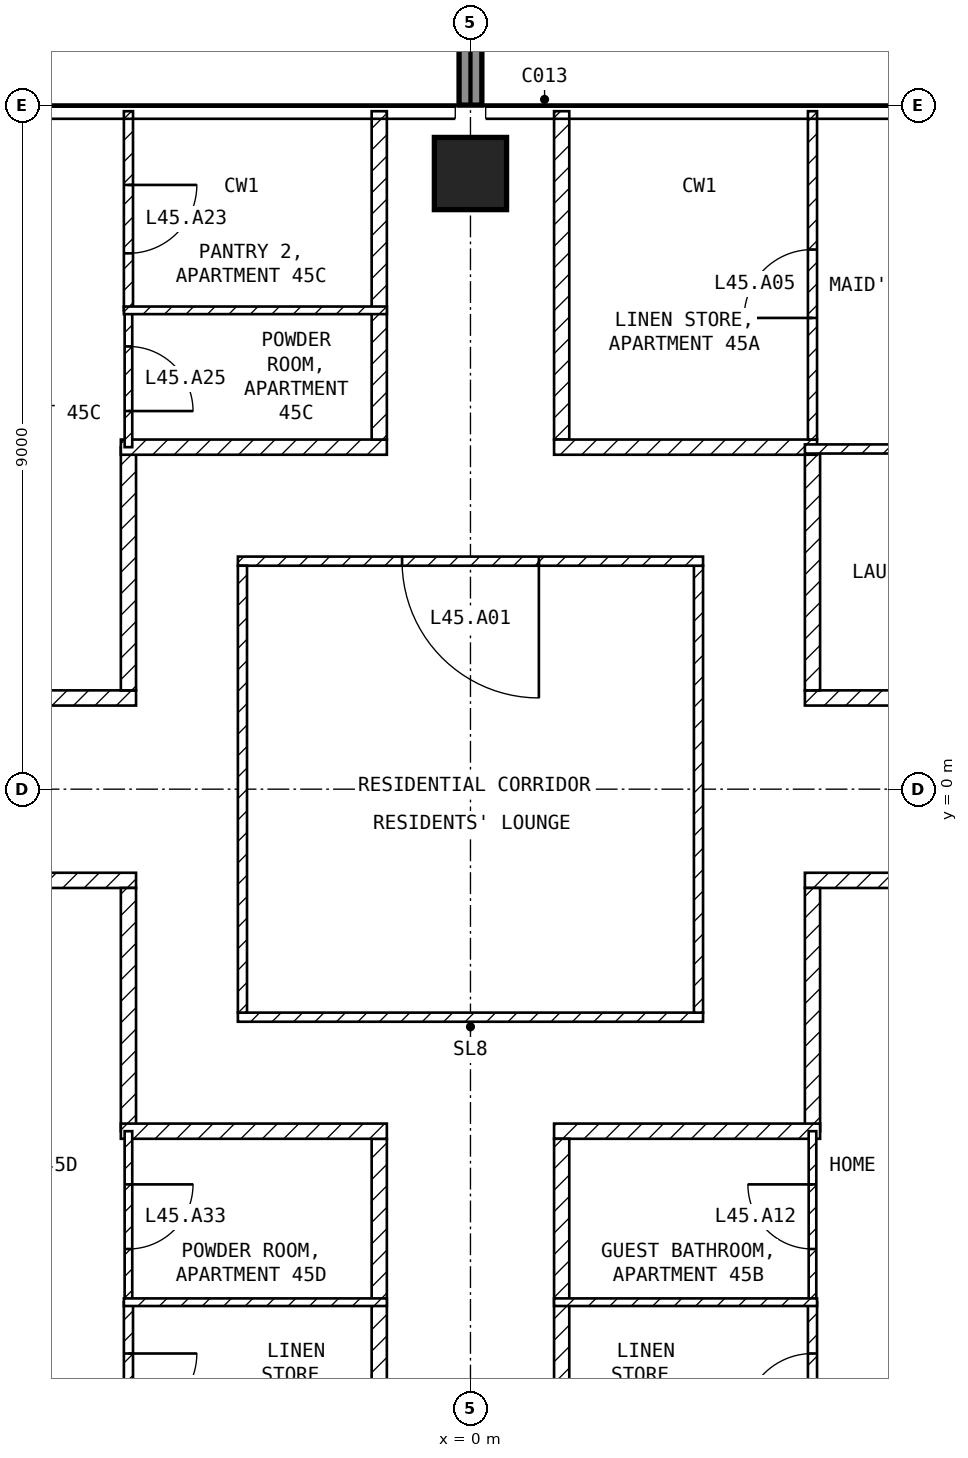
"""IFC4 building model, lengths in metres.
Left out: names, types, materials, properties, quantities, classifications, styles, units other than length and angle.
Written with IfcOpenShell. Run it as: python <this file> out.ifc"""

import sys

from ifc_helpers import new_model, si_unit, direction, frame, frame_2d, origin, origin_2d, place, context, subcontext, project, spatial, rectangle, extrude, element, fill, save


model = new_model("IFC4")
c1 = context("Model", 3, precision=1e-05, world=origin(), true_north=direction((0.0, 1.0)))
c2 = subcontext(c1, "Body", "Model", "MODEL_VIEW")
j1 = project(units=[si_unit("LENGTHUNIT", "METRE"), si_unit("PLANEANGLEUNIT", "RADIAN")], contexts=[c1])
p1 = place(None, origin())
s1 = spatial("IfcSite", under=j1, at=p1, CompositionType="ELEMENT")
p2 = place(p1, origin())
s2 = spatial("IfcBuilding", under=s1, at=p2, CompositionType="ELEMENT")
p3 = place(p2, frame((0.0, 0.0, 184.1)))
s3 = spatial("IfcBuildingStorey", under=s2, at=p3, CompositionType="ELEMENT", Elevation=184.1)
p4 = place(p3, frame((0.0, 8.1, -0.25), z_axis=(0.0, 0.0, 1.0), x_axis=(1.0, 0.0, 0.0)))
e1 = element("IfcColumn", 1, at=p4, inside=s3, PredefinedType="COLUMN", context=c2, shape_type="SweptSolid", body=[
    extrude(rectangle(XDim=0.95, YDim=0.95, at=origin_2d()), origin(), (0.0, 0.0, 1.0), 3.5),
])
p5 = place(p3, frame((0.0, 9.0, 0.0), z_axis=(0.0, 0.0, 1.0), x_axis=(0.0, 1.0, 0.0)))
e2 = element("IfcWall", 2, at=p5, inside=s3, PredefinedType="SOLIDWALL", context=c2, shape_type="SweptSolid", body=[
    extrude(rectangle(XDim=2.7, YDim=0.3, at=frame_2d((1.35, 0.0))), origin(), (0.0, 0.0, 1.0), 3.25),
])
p6 = place(p3, frame((-3.06, -3.0, 0.0), z_axis=(0.0, 0.0, 1.0), x_axis=(1.0, 0.0, 0.0)))
e3 = element("IfcWall", 3, at=p6, inside=s3, PredefinedType="PARTITIONING", context=c2, shape_type="SweptSolid", body=[
    extrude(rectangle(XDim=6.12, YDim=0.12, at=frame_2d((3.06, 0.0))), origin(), (0.0, 0.0, 1.0), 3.25),
])
p7 = place(p3, frame((3.0, -2.94, 0.0), z_axis=(0.0, 0.0, 1.0), x_axis=(0.0, 1.0, 0.0)))
e4 = element("IfcWall", 4, at=p7, inside=s3, PredefinedType="PARTITIONING", context=c2, shape_type="SweptSolid", body=[
    extrude(rectangle(XDim=5.88, YDim=0.12, at=frame_2d((2.94, 0.0))), origin(), (0.0, 0.0, 1.0), 3.25),
])
p8 = place(p3, frame((3.06, 3.0, 0.0), z_axis=(0.0, 0.0, 1.0), x_axis=(-1.0, 0.0, 0.0)))
e5 = element("IfcWall", 5, at=p8, inside=s3, PredefinedType="PARTITIONING", context=c2, shape_type="SweptSolid", body=[
    extrude(rectangle(XDim=6.12, YDim=0.12, at=frame_2d((3.06, 0.0))), origin(), (0.0, 0.0, 1.0), 3.25),
])
p9 = place(p8, frame((2.16, 0.0, 0.0)))
e6 = element("IfcOpeningElement", 6, at=p9, cuts=e5, PredefinedType="OPENING", context=c2, shape_type="SweptSolid", body=[
    extrude(rectangle(XDim=1.8, YDim=2.1, at=frame_2d((0.9, 1.05))), frame((0.0, 0.07, 0.0), z_axis=(0.0, -1.0, 0.0), x_axis=(1.0, 0.0, 0.0)), (0.0, 0.0, 1.0), 0.14),
])
p10 = place(p3, frame((-3.0, 2.94, 0.0), z_axis=(0.0, 0.0, 1.0), x_axis=(0.0, -1.0, 0.0)))
e7 = element("IfcWall", 7, at=p10, inside=s3, PredefinedType="PARTITIONING", context=c2, shape_type="SweptSolid", body=[
    extrude(rectangle(XDim=5.88, YDim=0.12, at=frame_2d((2.94, 0.0))), origin(), (0.0, 0.0, 1.0), 3.25),
])
p11 = place(p3, frame((4.4, 1.2, 0.0), z_axis=(0.0, 0.0, 1.0), x_axis=(1.0, 0.0, 0.0)))
e8 = element("IfcWall", 8, at=p11, inside=s3, PredefinedType="PARTITIONING", context=c2, shape_type="SweptSolid", body=[
    extrude(rectangle(XDim=17.2, YDim=0.2, at=frame_2d((8.6, 0.0))), origin(), (0.0, 0.0, 1.0), 3.25),
])
p12 = place(p11, frame((8.675, 0.0, 0.0)))
e9 = element("IfcOpeningElement", 9, at=p12, cuts=e8, PredefinedType="OPENING", context=c2, shape_type="SweptSolid", body=[
    extrude(rectangle(XDim=1.0, YDim=2.1, at=frame_2d((0.5, 1.05))), frame((0.0, 0.11, 0.0), z_axis=(0.0, -1.0, 0.0), x_axis=(1.0, 0.0, 0.0)), (0.0, 0.0, 1.0), 0.22),
])
p13 = place(p3, frame((4.5, 4.416, 0.0), z_axis=(0.0, 0.0, 1.0), x_axis=(0.0, -1.0, 0.0)))
e10 = element("IfcWall", 10, at=p13, inside=s3, PredefinedType="PARTITIONING", context=c2, shape_type="SweptSolid", body=[
    extrude(rectangle(XDim=3.116, YDim=0.2, at=frame_2d((1.558, 0.0))), origin(), (0.0, 0.0, 1.0), 3.25),
])
p14 = place(p3, frame((1.2, 8.92, 0.0), z_axis=(0.0, 0.0, 1.0), x_axis=(0.0, -1.0, 0.0)))
e11 = element("IfcWall", 11, at=p14, inside=s3, PredefinedType="PARTITIONING", context=c2, shape_type="SweptSolid", body=[
    extrude(rectangle(XDim=4.32, YDim=0.2, at=frame_2d((2.16, 0.0))), origin(), (0.0, 0.0, 1.0), 3.25),
])
p15 = place(p3, frame((1.1, 4.5, 0.0), z_axis=(0.0, 0.0, 1.0), x_axis=(1.0, 0.0, 0.0)))
e12 = element("IfcWall", 12, at=p15, inside=s3, PredefinedType="PARTITIONING", context=c2, shape_type="SweptSolid", body=[
    extrude(rectangle(XDim=3.46, YDim=0.2, at=frame_2d((1.73, 0.0))), origin(), (0.0, 0.0, 1.0), 3.25),
])
p16 = place(p3, frame((21.6, -1.2, 0.0), z_axis=(0.0, 0.0, 1.0), x_axis=(-1.0, 0.0, 0.0)))
e13 = element("IfcWall", 13, at=p16, inside=s3, PredefinedType="PARTITIONING", context=c2, shape_type="SweptSolid", body=[
    extrude(rectangle(XDim=17.2, YDim=0.2, at=frame_2d((8.6, 0.0))), origin(), (0.0, 0.0, 1.0), 3.25),
])
p17 = place(p16, frame((10.3, 0.0, 0.0)))
e14 = element("IfcOpeningElement", 14, at=p17, cuts=e13, PredefinedType="OPENING", context=c2, shape_type="SweptSolid", body=[
    extrude(rectangle(XDim=1.0, YDim=2.1, at=frame_2d((0.5, 1.05))), frame((0.0, 0.11, 0.0), z_axis=(0.0, -1.0, 0.0), x_axis=(1.0, 0.0, 0.0)), (0.0, 0.0, 1.0), 0.22),
])
p18 = place(p3, frame((4.5, -1.3, 0.0), z_axis=(0.0, 0.0, 1.0), x_axis=(0.0, -1.0, 0.0)))
e15 = element("IfcWall", 15, at=p18, inside=s3, PredefinedType="PARTITIONING", context=c2, shape_type="SweptSolid", body=[
    extrude(rectangle(XDim=3.2, YDim=0.2, at=frame_2d((1.6, 0.0))), origin(), (0.0, 0.0, 1.0), 3.25),
])
p19 = place(p3, frame((4.6, -4.5, 0.0), z_axis=(0.0, 0.0, 1.0), x_axis=(-1.0, 0.0, 0.0)))
e16 = element("IfcWall", 16, at=p19, inside=s3, PredefinedType="PARTITIONING", context=c2, shape_type="SweptSolid", body=[
    extrude(rectangle(XDim=3.5, YDim=0.2, at=frame_2d((1.75, 0.0))), origin(), (0.0, 0.0, 1.0), 3.25),
])
p20 = place(p3, frame((1.2, -4.6, 0.0), z_axis=(0.0, 0.0, 1.0), x_axis=(0.0, -1.0, 0.0)))
e17 = element("IfcWall", 17, at=p20, inside=s3, PredefinedType="PARTITIONING", context=c2, shape_type="SweptSolid", body=[
    extrude(rectangle(XDim=4.3, YDim=0.2, at=frame_2d((2.15, 0.0))), origin(), (0.0, 0.0, 1.0), 3.25),
])
p21 = place(p3, frame((-21.6, 1.2, 0.0), z_axis=(0.0, 0.0, 1.0), x_axis=(1.0, 0.0, 0.0)))
e18 = element("IfcWall", 18, at=p21, inside=s3, PredefinedType="PARTITIONING", context=c2, shape_type="SweptSolid", body=[
    extrude(rectangle(XDim=17.2, YDim=0.2, at=frame_2d((8.6, 0.0))), origin(), (0.0, 0.0, 1.0), 3.25),
])
p22 = place(p21, frame((7.75, 0.0, 0.0)))
e19 = element("IfcOpeningElement", 19, at=p22, cuts=e18, PredefinedType="OPENING", context=c2, shape_type="SweptSolid", body=[
    extrude(rectangle(XDim=1.0, YDim=2.1, at=frame_2d((0.5, 1.05))), frame((0.0, 0.11, 0.0), z_axis=(0.0, -1.0, 0.0), x_axis=(1.0, 0.0, 0.0)), (0.0, 0.0, 1.0), 0.22),
])
p23 = place(p3, frame((-4.5, 1.3, 0.0), z_axis=(0.0, 0.0, 1.0), x_axis=(0.0, 1.0, 0.0)))
e20 = element("IfcWall", 20, at=p23, inside=s3, PredefinedType="PARTITIONING", context=c2, shape_type="SweptSolid", body=[
    extrude(rectangle(XDim=3.2, YDim=0.2, at=frame_2d((1.6, 0.0))), origin(), (0.0, 0.0, 1.0), 3.25),
])
p24 = place(p3, frame((-4.6, 4.5, 0.0), z_axis=(0.0, 0.0, 1.0), x_axis=(1.0, 0.0, 0.0)))
e21 = element("IfcWall", 21, at=p24, inside=s3, PredefinedType="PARTITIONING", context=c2, shape_type="SweptSolid", body=[
    extrude(rectangle(XDim=3.5, YDim=0.2, at=frame_2d((1.75, 0.0))), origin(), (0.0, 0.0, 1.0), 3.25),
])
p25 = place(p3, frame((-1.2, 4.6, 0.0), z_axis=(0.0, 0.0, 1.0), x_axis=(0.0, 1.0, 0.0)))
e22 = element("IfcWall", 22, at=p25, inside=s3, PredefinedType="PARTITIONING", context=c2, shape_type="SweptSolid", body=[
    extrude(rectangle(XDim=4.32, YDim=0.2, at=frame_2d((2.16, 0.0))), origin(), (0.0, 0.0, 1.0), 3.25),
])
p26 = place(p3, frame((-4.4, -1.2, 0.0), z_axis=(0.0, 0.0, 1.0), x_axis=(-1.0, 0.0, 0.0)))
e23 = element("IfcWall", 23, at=p26, inside=s3, PredefinedType="PARTITIONING", context=c2, shape_type="SweptSolid", body=[
    extrude(rectangle(XDim=17.2, YDim=0.2, at=frame_2d((8.6, 0.0))), origin(), (0.0, 0.0, 1.0), 3.25),
])
p27 = place(p26, frame((12.35, 0.0, 0.0)))
e24 = element("IfcOpeningElement", 24, at=p27, cuts=e23, PredefinedType="OPENING", context=c2, shape_type="SweptSolid", body=[
    extrude(rectangle(XDim=1.0, YDim=2.1, at=frame_2d((0.5, 1.05))), frame((0.0, 0.11, 0.0), z_axis=(0.0, -1.0, 0.0), x_axis=(1.0, 0.0, 0.0)), (0.0, 0.0, 1.0), 0.22),
])
p28 = place(p3, frame((-4.5, -4.5, 0.0), z_axis=(0.0, 0.0, 1.0), x_axis=(0.0, 1.0, 0.0)))
e25 = element("IfcWall", 25, at=p28, inside=s3, PredefinedType="PARTITIONING", context=c2, shape_type="SweptSolid", body=[
    extrude(rectangle(XDim=3.2, YDim=0.2, at=frame_2d((1.6, 0.0))), origin(), (0.0, 0.0, 1.0), 3.25),
])
p29 = place(p3, frame((-1.2, -8.9, 0.0), z_axis=(0.0, 0.0, 1.0), x_axis=(0.0, 1.0, 0.0)))
e26 = element("IfcWall", 26, at=p29, inside=s3, PredefinedType="PARTITIONING", context=c2, shape_type="SweptSolid", body=[
    extrude(rectangle(XDim=4.3, YDim=0.2, at=frame_2d((2.15, 0.0))), origin(), (0.0, 0.0, 1.0), 3.25),
])
p30 = place(p3, frame((-1.1, -4.5, 0.0), z_axis=(0.0, 0.0, 1.0), x_axis=(-1.0, 0.0, 0.0)))
e27 = element("IfcWall", 27, at=p30, inside=s3, PredefinedType="PARTITIONING", context=c2, shape_type="SweptSolid", body=[
    extrude(rectangle(XDim=3.5, YDim=0.2, at=frame_2d((1.75, 0.0))), origin(), (0.0, 0.0, 1.0), 3.25),
])
p31 = place(p3, frame((4.4, 4.476, 0.0), z_axis=(0.0, 0.0, 1.0), x_axis=(1.0, 0.0, 0.0)))
e28 = element("IfcWall", 28, at=p31, inside=s3, PredefinedType="PARTITIONING", context=c2, shape_type="SweptSolid", body=[
    extrude(rectangle(XDim=4.66, YDim=0.12, at=frame_2d((2.33, 0.0))), origin(), (0.0, 0.0, 1.0), 3.25),
])
p32 = place(p31, frame((1.9, 0.0, 0.0)))
e29 = element("IfcOpeningElement", 29, at=p32, cuts=e28, PredefinedType="OPENING", context=c2, shape_type="SweptSolid", body=[
    extrude(rectangle(XDim=0.9, YDim=2.1, at=frame_2d((0.45, 1.05))), frame((0.0, 0.07, 0.0), z_axis=(0.0, -1.0, 0.0), x_axis=(1.0, 0.0, 0.0)), (0.0, 0.0, 1.0), 0.14),
])
p33 = place(p3, frame((4.5, 4.6, 0.0), z_axis=(0.0, 0.0, 1.0), x_axis=(0.0, 1.0, 0.0)))
e30 = element("IfcWall", 30, at=p33, inside=s3, PredefinedType="PARTITIONING", context=c2, shape_type="SweptSolid", body=[
    extrude(rectangle(XDim=4.32, YDim=0.12, at=frame_2d((2.16, 0.0))), origin(), (0.0, 0.0, 1.0), 3.25),
])
p34 = place(p33, frame((1.6, 0.0, 0.0)))
e31 = element("IfcOpeningElement", 31, at=p34, cuts=e30, PredefinedType="OPENING", context=c2, shape_type="SweptSolid", body=[
    extrude(rectangle(XDim=0.9, YDim=2.1, at=frame_2d((0.45, 1.05))), frame((0.0, 0.07, 0.0), z_axis=(0.0, -1.0, 0.0), x_axis=(1.0, 0.0, 0.0)), (0.0, 0.0, 1.0), 0.14),
])
p35 = place(p3, frame((4.5, -6.75, 0.0), z_axis=(0.0, 0.0, 1.0), x_axis=(0.0, 1.0, 0.0)))
e32 = element("IfcWall", 32, at=p35, inside=s3, PredefinedType="PARTITIONING", context=c2, shape_type="SweptSolid", body=[
    extrude(rectangle(XDim=2.25, YDim=0.1, at=frame_2d((1.125, 0.0))), origin(), (0.0, 0.0, 1.0), 3.25),
])
p36 = place(p35, frame((0.7, 0.0, 0.0)))
e33 = element("IfcOpeningElement", 33, at=p36, cuts=e32, PredefinedType="OPENING", context=c2, shape_type="SweptSolid", body=[
    extrude(rectangle(XDim=0.85, YDim=2.1, at=frame_2d((0.425, 1.05))), frame((0.0, 0.06, 0.0), z_axis=(0.0, -1.0, 0.0), x_axis=(1.0, 0.0, 0.0)), (0.0, 0.0, 1.0), 0.12),
])
p37 = place(p3, frame((4.5, -9.0, 0.0), z_axis=(0.0, 0.0, 1.0), x_axis=(0.0, 1.0, 0.0)))
e34 = element("IfcWall", 34, at=p37, inside=s3, PredefinedType="PARTITIONING", context=c2, shape_type="SweptSolid", body=[
    extrude(rectangle(XDim=2.25, YDim=0.12, at=frame_2d((1.125, 0.0))), origin(), (0.0, 0.0, 1.0), 3.25),
])
p38 = place(p37, frame((0.675, 0.0, 0.0)))
e35 = element("IfcOpeningElement", 35, at=p38, cuts=e34, PredefinedType="OPENING", context=c2, shape_type="SweptSolid", body=[
    extrude(rectangle(XDim=0.9, YDim=2.1, at=frame_2d((0.45, 1.05))), frame((0.0, 0.07, 0.0), z_axis=(0.0, -1.0, 0.0), x_axis=(1.0, 0.0, 0.0)), (0.0, 0.0, 1.0), 0.14),
])
p39 = place(p3, frame((4.56, -6.75, 0.0), z_axis=(0.0, 0.0, 1.0), x_axis=(-1.0, 0.0, 0.0)))
e36 = element("IfcWall", 36, at=p39, inside=s3, PredefinedType="PARTITIONING", context=c2, shape_type="SweptSolid", body=[
    extrude(rectangle(XDim=3.46, YDim=0.1, at=frame_2d((1.73, 0.0))), origin(), (0.0, 0.0, 1.0), 3.25),
])
p40 = place(p3, frame((-4.5, 6.3, 0.0), z_axis=(0.0, 0.0, 1.0), x_axis=(0.0, -1.0, 0.0)))
e37 = element("IfcWall", 37, at=p40, inside=s3, PredefinedType="PARTITIONING", context=c2, shape_type="SweptSolid", body=[
    extrude(rectangle(XDim=1.8, YDim=0.1, at=frame_2d((0.9, 0.0))), origin(), (0.0, 0.0, 1.0), 3.25),
])
p41 = place(p40, frame((0.475, 0.0, 0.0)))
e38 = element("IfcOpeningElement", 38, at=p41, cuts=e37, PredefinedType="OPENING", context=c2, shape_type="SweptSolid", body=[
    extrude(rectangle(XDim=0.85, YDim=2.1, at=frame_2d((0.425, 1.05))), frame((0.0, 0.06, 0.0), z_axis=(0.0, -1.0, 0.0), x_axis=(1.0, 0.0, 0.0)), (0.0, 0.0, 1.0), 0.12),
])
p42 = place(p3, frame((-4.5, 8.92, 0.0), z_axis=(0.0, 0.0, 1.0), x_axis=(0.0, -1.0, 0.0)))
e39 = element("IfcWall", 39, at=p42, inside=s3, PredefinedType="PARTITIONING", context=c2, shape_type="SweptSolid", body=[
    extrude(rectangle(XDim=2.62, YDim=0.12, at=frame_2d((1.31, 0.0))), origin(), (0.0, 0.0, 1.0), 3.25),
])
p43 = place(p42, frame((0.97, 0.0, 0.0)))
e40 = element("IfcOpeningElement", 40, at=p43, cuts=e39, PredefinedType="OPENING", context=c2, shape_type="SweptSolid", body=[
    extrude(rectangle(XDim=0.9, YDim=2.1, at=frame_2d((0.45, 1.05))), frame((0.0, 0.07, 0.0), z_axis=(0.0, -1.0, 0.0), x_axis=(1.0, 0.0, 0.0)), (0.0, 0.0, 1.0), 0.14),
])
p44 = place(p3, frame((-4.56, 6.3, 0.0), z_axis=(0.0, 0.0, 1.0), x_axis=(1.0, 0.0, 0.0)))
e41 = element("IfcWall", 41, at=p44, inside=s3, PredefinedType="PARTITIONING", context=c2, shape_type="SweptSolid", body=[
    extrude(rectangle(XDim=3.46, YDim=0.1, at=frame_2d((1.73, 0.0))), origin(), (0.0, 0.0, 1.0), 3.25),
])
p45 = place(p3, frame((-4.5, -4.5, 0.0), z_axis=(0.0, 0.0, 1.0), x_axis=(0.0, -1.0, 0.0)))
e42 = element("IfcWall", 42, at=p45, inside=s3, PredefinedType="PARTITIONING", context=c2, shape_type="SweptSolid", body=[
    extrude(rectangle(XDim=2.25, YDim=0.1, at=frame_2d((1.125, 0.0))), origin(), (0.0, 0.0, 1.0), 3.25),
])
p46 = place(p45, frame((0.7, 0.0, 0.0)))
e43 = element("IfcOpeningElement", 43, at=p46, cuts=e42, PredefinedType="OPENING", context=c2, shape_type="SweptSolid", body=[
    extrude(rectangle(XDim=0.85, YDim=2.1, at=frame_2d((0.425, 1.05))), frame((0.0, 0.06, 0.0), z_axis=(0.0, -1.0, 0.0), x_axis=(1.0, 0.0, 0.0)), (0.0, 0.0, 1.0), 0.12),
])
p47 = place(p3, frame((-4.5, -6.75, 0.0), z_axis=(0.0, 0.0, 1.0), x_axis=(0.0, -1.0, 0.0)))
e44 = element("IfcWall", 44, at=p47, inside=s3, PredefinedType="PARTITIONING", context=c2, shape_type="SweptSolid", body=[
    extrude(rectangle(XDim=2.25, YDim=0.12, at=frame_2d((1.125, 0.0))), origin(), (0.0, 0.0, 1.0), 3.25),
])
p48 = place(p47, frame((0.675, 0.0, 0.0)))
e45 = element("IfcOpeningElement", 45, at=p48, cuts=e44, PredefinedType="OPENING", context=c2, shape_type="SweptSolid", body=[
    extrude(rectangle(XDim=0.9, YDim=2.1, at=frame_2d((0.45, 1.05))), frame((0.0, 0.07, 0.0), z_axis=(0.0, -1.0, 0.0), x_axis=(1.0, 0.0, 0.0)), (0.0, 0.0, 1.0), 0.14),
])
p49 = place(p3, frame((-1.1, -6.75, 0.0), z_axis=(0.0, 0.0, 1.0), x_axis=(-1.0, 0.0, 0.0)))
e46 = element("IfcWall", 46, at=p49, inside=s3, PredefinedType="PARTITIONING", context=c2, shape_type="SweptSolid", body=[
    extrude(rectangle(XDim=3.46, YDim=0.1, at=frame_2d((1.73, 0.0))), origin(), (0.0, 0.0, 1.0), 3.25),
])
p50 = place(p9, origin())
e47 = element("IfcDoor", 47, at=p50, inside=s3, OperationType="SINGLE_SWING_LEFT", PredefinedType="DOOR", context=c2, shape_type="SweptSolid", body=[
    extrude(rectangle(XDim=1.8, YDim=2.1, at=frame_2d((0.9, 1.05))), frame((0.0, 0.025, 0.0), z_axis=(0.0, -1.0, 0.0), x_axis=(1.0, 0.0, 0.0)), (0.0, 0.0, 1.0), 0.05),
])
fill(e6, e47)
p51 = place(p34, origin())
e48 = element("IfcDoor", 48, at=p51, inside=s3, OperationType="SINGLE_SWING_LEFT", PredefinedType="DOOR", context=c2, shape_type="SweptSolid", body=[
    extrude(rectangle(XDim=0.9, YDim=2.1, at=frame_2d((0.45, 1.05))), frame((0.0, 0.025, 0.0), z_axis=(0.0, -1.0, 0.0), x_axis=(1.0, 0.0, 0.0)), (0.0, 0.0, 1.0), 0.05),
])
fill(e31, e48)
p52 = place(p36, origin())
e49 = element("IfcDoor", 49, at=p52, inside=s3, OperationType="SINGLE_SWING_RIGHT", PredefinedType="DOOR", context=c2, shape_type="SweptSolid", body=[
    extrude(rectangle(XDim=0.85, YDim=2.1, at=frame_2d((0.425, 1.05))), frame((0.0, 0.025, 0.0), z_axis=(0.0, -1.0, 0.0), x_axis=(1.0, 0.0, 0.0)), (0.0, 0.0, 1.0), 0.05),
])
fill(e33, e49)
p53 = place(p38, origin())
e50 = element("IfcDoor", 50, at=p53, inside=s3, OperationType="SINGLE_SWING_LEFT", PredefinedType="DOOR", context=c2, shape_type="SweptSolid", body=[
    extrude(rectangle(XDim=0.9, YDim=2.1, at=frame_2d((0.45, 1.05))), frame((0.0, 0.025, 0.0), z_axis=(0.0, -1.0, 0.0), x_axis=(1.0, 0.0, 0.0)), (0.0, 0.0, 1.0), 0.05),
])
fill(e35, e50)
p54 = place(p43, origin())
e51 = element("IfcDoor", 51, at=p54, inside=s3, OperationType="SINGLE_SWING_LEFT", PredefinedType="DOOR", context=c2, shape_type="SweptSolid", body=[
    extrude(rectangle(XDim=0.9, YDim=2.1, at=frame_2d((0.45, 1.05))), frame((0.0, 0.025, 0.0), z_axis=(0.0, -1.0, 0.0), x_axis=(1.0, 0.0, 0.0)), (0.0, 0.0, 1.0), 0.05),
])
fill(e40, e51)
p55 = place(p41, origin())
e52 = element("IfcDoor", 52, at=p55, inside=s3, OperationType="SINGLE_SWING_RIGHT", PredefinedType="DOOR", context=c2, shape_type="SweptSolid", body=[
    extrude(rectangle(XDim=0.85, YDim=2.1, at=frame_2d((0.425, 1.05))), frame((0.0, 0.025, 0.0), z_axis=(0.0, -1.0, 0.0), x_axis=(1.0, 0.0, 0.0)), (0.0, 0.0, 1.0), 0.05),
])
fill(e38, e52)
p56 = place(p48, origin())
e53 = element("IfcDoor", 53, at=p56, inside=s3, OperationType="SINGLE_SWING_LEFT", PredefinedType="DOOR", context=c2, shape_type="SweptSolid", body=[
    extrude(rectangle(XDim=0.9, YDim=2.1, at=frame_2d((0.45, 1.05))), frame((0.0, 0.025, 0.0), z_axis=(0.0, -1.0, 0.0), x_axis=(1.0, 0.0, 0.0)), (0.0, 0.0, 1.0), 0.05),
])
fill(e45, e53)
p57 = place(p46, origin())
e54 = element("IfcDoor", 54, at=p57, inside=s3, OperationType="SINGLE_SWING_LEFT", PredefinedType="DOOR", context=c2, shape_type="SweptSolid", body=[
    extrude(rectangle(XDim=0.85, YDim=2.1, at=frame_2d((0.425, 1.05))), frame((0.0, 0.025, 0.0), z_axis=(0.0, -1.0, 0.0), x_axis=(1.0, 0.0, 0.0)), (0.0, 0.0, 1.0), 0.05),
])
fill(e43, e54)
save(model, sys.argv[1])
